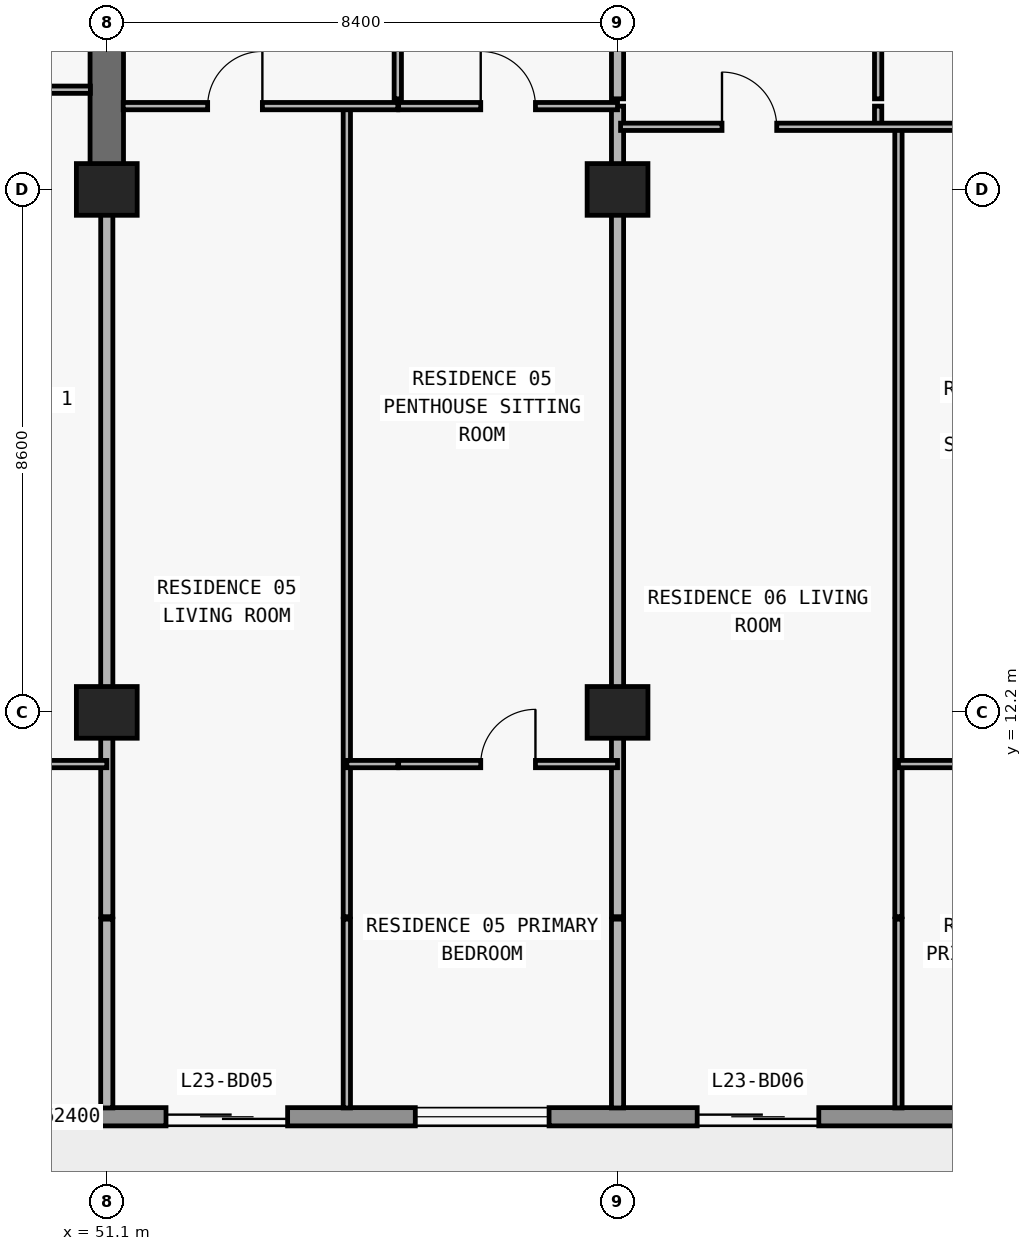
"""IFC4 building model, lengths in metres.
Left out: names, types, materials, properties, quantities, classifications, styles, units other than length and angle.
Written with IfcOpenShell. Run it as: python <this file> out.ifc"""

import sys

from ifc_helpers import new_model, si_unit, direction, frame, frame_2d, origin, origin_2d, place, context, subcontext, project, spatial, rectangle, extrude, element, fill, save


model = new_model("IFC4")
c1 = context("Model", 3, precision=1e-05, world=origin(), true_north=direction((0.0, 1.0)))
c2 = subcontext(c1, "Body", "Model", "MODEL_VIEW")
j1 = project(units=[si_unit("LENGTHUNIT", "METRE"), si_unit("PLANEANGLEUNIT", "RADIAN")], contexts=[c1])
p1 = place(None, origin())
s1 = spatial("IfcSite", under=j1, at=p1, CompositionType="ELEMENT")
p2 = place(p1, origin())
s2 = spatial("IfcBuilding", under=s1, at=p2, CompositionType="ELEMENT")
p3 = place(p2, frame((0.0, 0.0, 87.9)))
s3 = spatial("IfcBuildingStorey", under=s2, at=p3, CompositionType="ELEMENT", Elevation=87.9)
for number, where, z_axis, x_axis in (
    (1, (51.1, 12.2, 0.0), (0.0, 0.0, 1.0), (1.0, 0.0, 0.0)),
    (2, (59.5, 12.2, 0.0), (0.0, 0.0, 1.0), (1.0, 0.0, 0.0)),
    (3, (51.1, 20.8, 0.0), (0.0, 0.0, 1.0), (1.0, 0.0, 0.0)),
    (4, (59.5, 20.8, 0.0), (0.0, 0.0, 1.0), (1.0, 0.0, 0.0)),
):
    element("IfcColumn", number, at=place(p3, frame(where, z_axis=z_axis, x_axis=x_axis)), inside=s3, PredefinedType="COLUMN", context=c2, shape_type="SweptSolid", body=[
        extrude(rectangle(XDim=1.0, YDim=0.85, at=origin_2d()), origin(), (0.0, 0.0, 1.0), 3.05),
    ])
p4 = place(p3, frame((51.1, 20.8, 0.0), z_axis=(0.0, 0.0, 1.0), x_axis=(0.0, 1.0, 0.0)))
e5 = element("IfcWall", 5, at=p4, inside=s3, PredefinedType="SHEAR", context=c2, shape_type="SweptSolid", body=[
    extrude(rectangle(XDim=8.6, YDim=0.55, at=frame_2d((4.3, 0.0))), origin(), (0.0, 0.0, 1.0), 3.05),
])
p5 = place(p3, frame((70.1, 5.55, 0.0), z_axis=(0.0, 0.0, 1.0), x_axis=(-1.0, 0.0, 0.0)))
e6 = element("IfcWall", 6, at=p5, inside=s3, PredefinedType="STANDARD", context=c2, shape_type="SweptSolid", body=[
    extrude(rectangle(XDim=62.4, YDim=0.3, at=frame_2d((31.2, 0.0))), origin(), (0.0, 0.0, 1.0), 3.05),
])
p6 = place(p5, frame((57.226, 0.0, 0.0)))
e7 = element("IfcOpeningElement", 7, at=p6, cuts=e6, PredefinedType="OPENING", context=c2, shape_type="SweptSolid", body=[
    extrude(rectangle(XDim=2.0, YDim=2.3, at=frame_2d((1.0, 1.15))), frame((0.0, 0.16, 0.0), z_axis=(0.0, -1.0, 0.0), x_axis=(1.0, 0.0, 0.0)), (0.0, 0.0, 1.0), 0.32),
])
p7 = place(p5, frame((52.926, 0.0, 0.85)))
e8 = element("IfcOpeningElement", 8, at=p7, cuts=e6, PredefinedType="OPENING", context=c2, shape_type="SweptSolid", body=[
    extrude(rectangle(XDim=2.2, YDim=1.55, at=frame_2d((1.1, 0.775))), frame((0.0, 0.16, 0.0), z_axis=(0.0, -1.0, 0.0), x_axis=(1.0, 0.0, 0.0)), (0.0, 0.0, 1.0), 0.32),
])
p8 = place(p5, frame((48.49, 0.0, 0.0)))
e9 = element("IfcOpeningElement", 9, at=p8, cuts=e6, PredefinedType="OPENING", context=c2, shape_type="SweptSolid", body=[
    extrude(rectangle(XDim=2.0, YDim=2.3, at=frame_2d((1.0, 1.15))), frame((0.0, 0.16, 0.0), z_axis=(0.0, -1.0, 0.0), x_axis=(1.0, 0.0, 0.0)), (0.0, 0.0, 1.0), 0.32),
])
p9 = place(p5, frame((44.39, 0.0, 0.85)))
e10 = element("IfcOpeningElement", 10, at=p9, cuts=e6, PredefinedType="OPENING", context=c2, shape_type="SweptSolid", body=[
    extrude(rectangle(XDim=1.8, YDim=1.55, at=frame_2d((0.9, 0.775))), frame((0.0, 0.16, 0.0), z_axis=(0.0, -1.0, 0.0), x_axis=(1.0, 0.0, 0.0)), (0.0, 0.0, 1.0), 0.32),
])
p10 = place(p5, frame((40.426, 0.0, 0.0)))
e11 = element("IfcOpeningElement", 11, at=p10, cuts=e6, PredefinedType="OPENING", context=c2, shape_type="SweptSolid", body=[
    extrude(rectangle(XDim=2.0, YDim=2.3, at=frame_2d((1.0, 1.15))), frame((0.0, 0.16, 0.0), z_axis=(0.0, -1.0, 0.0), x_axis=(1.0, 0.0, 0.0)), (0.0, 0.0, 1.0), 0.32),
])
p11 = place(p5, frame((36.126, 0.0, 0.85)))
e12 = element("IfcOpeningElement", 12, at=p11, cuts=e6, PredefinedType="OPENING", context=c2, shape_type="SweptSolid", body=[
    extrude(rectangle(XDim=2.2, YDim=1.55, at=frame_2d((1.1, 0.775))), frame((0.0, 0.16, 0.0), z_axis=(0.0, -1.0, 0.0), x_axis=(1.0, 0.0, 0.0)), (0.0, 0.0, 1.0), 0.32),
])
p12 = place(p5, frame((32.09, 0.0, 0.0)))
e13 = element("IfcOpeningElement", 13, at=p12, cuts=e6, PredefinedType="OPENING", context=c2, shape_type="SweptSolid", body=[
    extrude(rectangle(XDim=2.0, YDim=2.3, at=frame_2d((1.0, 1.15))), frame((0.0, 0.16, 0.0), z_axis=(0.0, -1.0, 0.0), x_axis=(1.0, 0.0, 0.0)), (0.0, 0.0, 1.0), 0.32),
])
p13 = place(p5, frame((28.21, 0.0, 0.65)))
e14 = element("IfcOpeningElement", 14, at=p13, cuts=e6, PredefinedType="OPENING", context=c2, shape_type="SweptSolid", body=[
    extrude(rectangle(XDim=2.6, YDim=1.85, at=frame_2d((1.3, 0.925))), frame((0.0, 0.16, 0.0), z_axis=(0.0, -1.0, 0.0), x_axis=(1.0, 0.0, 0.0)), (0.0, 0.0, 1.0), 0.32),
])
p14 = place(p5, frame((22.1, 0.0, 0.85)))
e15 = element("IfcOpeningElement", 15, at=p14, cuts=e6, PredefinedType="OPENING", context=c2, shape_type="SweptSolid", body=[
    extrude(rectangle(XDim=2.2, YDim=1.55, at=frame_2d((1.1, 0.775))), frame((0.0, 0.16, 0.0), z_axis=(0.0, -1.0, 0.0), x_axis=(1.0, 0.0, 0.0)), (0.0, 0.0, 1.0), 0.32),
])
p15 = place(p5, frame((16.026, 0.0, 0.0)))
e16 = element("IfcOpeningElement", 16, at=p15, cuts=e6, PredefinedType="OPENING", context=c2, shape_type="SweptSolid", body=[
    extrude(rectangle(XDim=2.0, YDim=2.3, at=frame_2d((1.0, 1.15))), frame((0.0, 0.16, 0.0), z_axis=(0.0, -1.0, 0.0), x_axis=(1.0, 0.0, 0.0)), (0.0, 0.0, 1.0), 0.32),
])
p16 = place(p5, frame((11.726, 0.0, 0.85)))
e17 = element("IfcOpeningElement", 17, at=p16, cuts=e6, PredefinedType="OPENING", context=c2, shape_type="SweptSolid", body=[
    extrude(rectangle(XDim=2.2, YDim=1.55, at=frame_2d((1.1, 0.775))), frame((0.0, 0.16, 0.0), z_axis=(0.0, -1.0, 0.0), x_axis=(1.0, 0.0, 0.0)), (0.0, 0.0, 1.0), 0.32),
])
p17 = place(p5, frame((7.29, 0.0, 0.0)))
e18 = element("IfcOpeningElement", 18, at=p17, cuts=e6, PredefinedType="OPENING", context=c2, shape_type="SweptSolid", body=[
    extrude(rectangle(XDim=2.0, YDim=2.3, at=frame_2d((1.0, 1.15))), frame((0.0, 0.16, 0.0), z_axis=(0.0, -1.0, 0.0), x_axis=(1.0, 0.0, 0.0)), (0.0, 0.0, 1.0), 0.32),
])
p18 = place(p5, frame((3.19, 0.0, 0.85)))
e19 = element("IfcOpeningElement", 19, at=p18, cuts=e6, PredefinedType="OPENING", context=c2, shape_type="SweptSolid", body=[
    extrude(rectangle(XDim=1.8, YDim=1.55, at=frame_2d((0.9, 0.775))), frame((0.0, 0.16, 0.0), z_axis=(0.0, -1.0, 0.0), x_axis=(1.0, 0.0, 0.0)), (0.0, 0.0, 1.0), 0.32),
])
p19 = place(p3, frame((51.1, 5.695, 0.0), z_axis=(0.0, 0.0, 1.0), x_axis=(0.0, 1.0, 0.0)))
e20 = element("IfcWall", 20, at=p19, inside=s3, PredefinedType="PARTITIONING", context=c2, shape_type="SweptSolid", body=[
    extrude(rectangle(XDim=3.105, YDim=0.2, at=frame_2d((1.552, 0.0))), origin(), (0.0, 0.0, 1.0), 3.05),
])
p20 = place(p3, frame((51.1, 8.84, 0.0), z_axis=(0.0, 0.0, 1.0), x_axis=(0.0, 1.0, 0.0)))
e21 = element("IfcWall", 21, at=p20, inside=s3, PredefinedType="PARTITIONING", context=c2, shape_type="SweptSolid", body=[
    extrude(rectangle(XDim=11.955, YDim=0.2, at=frame_2d((5.978, 0.0))), origin(), (0.0, 0.0, 1.0), 2.174),
])
p21 = place(p3, frame((55.048, 5.695, 0.0), z_axis=(0.0, 0.0, 1.0), x_axis=(0.0, 1.0, 0.0)))
e22 = element("IfcWall", 22, at=p21, inside=s3, PredefinedType="PARTITIONING", context=c2, shape_type="SweptSolid", body=[
    extrude(rectangle(XDim=3.105, YDim=0.12, at=frame_2d((1.552, 0.0))), origin(), (0.0, 0.0, 1.0), 3.05),
])
p22 = place(p3, frame((55.048, 8.84, 0.0), z_axis=(0.0, 0.0, 1.0), x_axis=(0.0, 1.0, 0.0)))
e23 = element("IfcWall", 23, at=p22, inside=s3, PredefinedType="PARTITIONING", context=c2, shape_type="SweptSolid", body=[
    extrude(rectangle(XDim=13.33, YDim=0.12, at=frame_2d((6.665, 0.0))), origin(), (0.0, 0.0, 1.0), 3.05),
])
p23 = place(p3, frame((55.886, 22.29, 0.0), z_axis=(0.0, 0.0, 1.0), x_axis=(0.0, 1.0, 0.0)))
e24 = element("IfcWall", 24, at=p23, inside=s3, PredefinedType="PARTITIONING", context=c2, shape_type="SweptSolid", body=[
    extrude(rectangle(XDim=4.69, YDim=0.12, at=frame_2d((2.345, 0.0))), origin(), (0.0, 0.0, 1.0), 3.05),
])
p24 = place(p23, frame((1.895, 0.0, 0.0)))
e25 = element("IfcOpeningElement", 25, at=p24, cuts=e24, PredefinedType="OPENING", context=c2, shape_type="SweptSolid", body=[
    extrude(rectangle(XDim=0.9, YDim=2.15, at=frame_2d((0.45, 1.075))), frame((0.0, 0.07, 0.0), z_axis=(0.0, -1.0, 0.0), x_axis=(1.0, 0.0, 0.0)), (0.0, 0.0, 1.0), 0.14),
])
p25 = place(p3, frame((59.5, 5.695, 0.0), z_axis=(0.0, 0.0, 1.0), x_axis=(0.0, 1.0, 0.0)))
e26 = element("IfcWall", 26, at=p25, inside=s3, PredefinedType="PARTITIONING", context=c2, shape_type="SweptSolid", body=[
    extrude(rectangle(XDim=3.105, YDim=0.2, at=frame_2d((1.552, 0.0))), origin(), (0.0, 0.0, 1.0), 3.05),
])
p26 = place(p3, frame((59.5, 8.84, 0.0), z_axis=(0.0, 0.0, 1.0), x_axis=(0.0, 1.0, 0.0)))
e27 = element("IfcWall", 27, at=p26, inside=s3, PredefinedType="PARTITIONING", context=c2, shape_type="SweptSolid", body=[
    extrude(rectangle(XDim=13.33, YDim=0.2, at=frame_2d((6.665, 0.0))), origin(), (0.0, 0.0, 1.0), 2.174),
])
p27 = place(p3, frame((59.5, 22.29, 0.0), z_axis=(0.0, 0.0, 1.0), x_axis=(0.0, 1.0, 0.0)))
e28 = element("IfcWall", 28, at=p27, inside=s3, PredefinedType="PARTITIONING", context=c2, shape_type="SweptSolid", body=[
    extrude(rectangle(XDim=4.69, YDim=0.2, at=frame_2d((2.345, 0.0))), origin(), (0.0, 0.0, 1.0), 2.174),
])
p28 = place(p3, frame((63.786, 21.83, 0.0), z_axis=(0.0, 0.0, 1.0), x_axis=(0.0, 1.0, 0.0)))
e29 = element("IfcWall", 29, at=p28, inside=s3, PredefinedType="PARTITIONING", context=c2, shape_type="SweptSolid", body=[
    extrude(rectangle(XDim=0.34, YDim=0.12, at=frame_2d((0.17, 0.0))), origin(), (0.0, 0.0, 1.0), 3.05),
])
p29 = place(p3, frame((63.786, 22.29, 0.0), z_axis=(0.0, 0.0, 1.0), x_axis=(0.0, 1.0, 0.0)))
e30 = element("IfcWall", 30, at=p29, inside=s3, PredefinedType="PARTITIONING", context=c2, shape_type="SweptSolid", body=[
    extrude(rectangle(XDim=4.69, YDim=0.12, at=frame_2d((2.345, 0.0))), origin(), (0.0, 0.0, 1.0), 3.05),
])
p30 = place(p29, frame((1.895, 0.0, 0.0)))
e31 = element("IfcOpeningElement", 31, at=p30, cuts=e30, PredefinedType="OPENING", context=c2, shape_type="SweptSolid", body=[
    extrude(rectangle(XDim=0.9, YDim=2.15, at=frame_2d((0.45, 1.075))), frame((0.0, 0.07, 0.0), z_axis=(0.0, -1.0, 0.0), x_axis=(1.0, 0.0, 0.0)), (0.0, 0.0, 1.0), 0.14),
])
p31 = place(p3, frame((64.12, 5.695, 0.0), z_axis=(0.0, 0.0, 1.0), x_axis=(0.0, 1.0, 0.0)))
e32 = element("IfcWall", 32, at=p31, inside=s3, PredefinedType="PARTITIONING", context=c2, shape_type="SweptSolid", body=[
    extrude(rectangle(XDim=3.105, YDim=0.12, at=frame_2d((1.552, 0.0))), origin(), (0.0, 0.0, 1.0), 3.05),
])
p32 = place(p3, frame((64.12, 8.84, 0.0), z_axis=(0.0, 0.0, 1.0), x_axis=(0.0, 1.0, 0.0)))
e33 = element("IfcWall", 33, at=p32, inside=s3, PredefinedType="PARTITIONING", context=c2, shape_type="SweptSolid", body=[
    extrude(rectangle(XDim=12.99, YDim=0.12, at=frame_2d((6.495, 0.0))), origin(), (0.0, 0.0, 1.0), 3.05),
])
p33 = place(p3, frame((42.7, 11.35, 0.0), z_axis=(0.0, 0.0, 1.0), x_axis=(1.0, 0.0, 0.0)))
e34 = element("IfcWall", 34, at=p33, inside=s3, PredefinedType="PARTITIONING", context=c2, shape_type="SweptSolid", body=[
    extrude(rectangle(XDim=8.4, YDim=0.12, at=frame_2d((4.2, 0.0))), origin(), (0.0, 0.0, 1.0), 3.05),
])
p34 = place(p33, frame((3.75, 0.0, 0.0)))
e35 = element("IfcOpeningElement", 35, at=p34, cuts=e34, PredefinedType="OPENING", context=c2, shape_type="SweptSolid", body=[
    extrude(rectangle(XDim=0.9, YDim=2.15, at=frame_2d((0.45, 1.075))), frame((0.0, 0.07, 0.0), z_axis=(0.0, -1.0, 0.0), x_axis=(1.0, 0.0, 0.0)), (0.0, 0.0, 1.0), 0.14),
])
p35 = place(p3, frame((55.048, 11.35, 0.0), z_axis=(0.0, 0.0, 1.0), x_axis=(1.0, 0.0, 0.0)))
e36 = element("IfcWall", 36, at=p35, inside=s3, PredefinedType="PARTITIONING", context=c2, shape_type="SweptSolid", body=[
    extrude(rectangle(XDim=0.838, YDim=0.12, at=frame_2d((0.419, 0.0))), origin(), (0.0, 0.0, 1.0), 3.05),
])
p36 = place(p3, frame((55.9, 11.35, 0.0), z_axis=(0.0, 0.0, 1.0), x_axis=(1.0, 0.0, 0.0)))
e37 = element("IfcWall", 37, at=p36, inside=s3, PredefinedType="PARTITIONING", context=c2, shape_type="SweptSolid", body=[
    extrude(rectangle(XDim=3.6, YDim=0.12, at=frame_2d((1.8, 0.0))), origin(), (0.0, 0.0, 1.0), 3.05),
])
p37 = place(p36, frame((1.35, 0.0, 0.0)))
e38 = element("IfcOpeningElement", 38, at=p37, cuts=e37, PredefinedType="OPENING", context=c2, shape_type="SweptSolid", body=[
    extrude(rectangle(XDim=0.9, YDim=2.15, at=frame_2d((0.45, 1.075))), frame((0.0, 0.07, 0.0), z_axis=(0.0, -1.0, 0.0), x_axis=(1.0, 0.0, 0.0)), (0.0, 0.0, 1.0), 0.14),
])
p38 = place(p3, frame((64.12, 11.35, 0.0), z_axis=(0.0, 0.0, 1.0), x_axis=(1.0, 0.0, 0.0)))
e39 = element("IfcWall", 39, at=p38, inside=s3, PredefinedType="PARTITIONING", context=c2, shape_type="SweptSolid", body=[
    extrude(rectangle(XDim=3.78, YDim=0.12, at=frame_2d((1.89, 0.0))), origin(), (0.0, 0.0, 1.0), 3.05),
])
p39 = place(p38, frame((1.44, 0.0, 0.0)))
e40 = element("IfcOpeningElement", 40, at=p39, cuts=e39, PredefinedType="OPENING", context=c2, shape_type="SweptSolid", body=[
    extrude(rectangle(XDim=0.9, YDim=2.15, at=frame_2d((0.45, 1.075))), frame((0.0, 0.07, 0.0), z_axis=(0.0, -1.0, 0.0), x_axis=(1.0, 0.0, 0.0)), (0.0, 0.0, 1.0), 0.14),
])
p40 = place(p3, frame((59.55, 21.83, 0.0), z_axis=(0.0, 0.0, 1.0), x_axis=(1.0, 0.0, 0.0)))
e41 = element("IfcWall", 41, at=p40, inside=s3, PredefinedType="PARTITIONING", context=c2, shape_type="SweptSolid", body=[
    extrude(rectangle(XDim=8.35, YDim=0.12, at=frame_2d((4.175, 0.0))), origin(), (0.0, 0.0, 1.0), 3.05),
])
p41 = place(p40, frame((1.668, 0.0, 0.0)))
e42 = element("IfcOpeningElement", 42, at=p41, cuts=e41, PredefinedType="OPENING", context=c2, shape_type="SweptSolid", body=[
    extrude(rectangle(XDim=0.9, YDim=2.15, at=frame_2d((0.45, 1.075))), frame((0.0, 0.07, 0.0), z_axis=(0.0, -1.0, 0.0), x_axis=(1.0, 0.0, 0.0)), (0.0, 0.0, 1.0), 0.14),
])
p42 = place(p40, frame((6.01, 0.0, 0.0)))
e43 = element("IfcOpeningElement", 43, at=p42, cuts=e41, PredefinedType="OPENING", context=c2, shape_type="SweptSolid", body=[
    extrude(rectangle(XDim=0.9, YDim=2.15, at=frame_2d((0.45, 1.075))), frame((0.0, 0.07, 0.0), z_axis=(0.0, -1.0, 0.0), x_axis=(1.0, 0.0, 0.0)), (0.0, 0.0, 1.0), 0.14),
])
p43 = place(p3, frame((51.37, 22.17, 0.0), z_axis=(0.0, 0.0, 1.0), x_axis=(1.0, 0.0, 0.0)))
e44 = element("IfcWall", 44, at=p43, inside=s3, PredefinedType="PARTITIONING", context=c2, shape_type="SweptSolid", body=[
    extrude(rectangle(XDim=4.516, YDim=0.12, at=frame_2d((2.258, 0.0))), origin(), (0.0, 0.0, 1.0), 3.05),
])
p44 = place(p43, frame((1.389, 0.0, 0.0)))
e45 = element("IfcOpeningElement", 45, at=p44, cuts=e44, PredefinedType="OPENING", context=c2, shape_type="SweptSolid", body=[
    extrude(rectangle(XDim=0.9, YDim=2.15, at=frame_2d((0.45, 1.075))), frame((0.0, 0.07, 0.0), z_axis=(0.0, -1.0, 0.0), x_axis=(1.0, 0.0, 0.0)), (0.0, 0.0, 1.0), 0.14),
])
p45 = place(p3, frame((55.9, 22.17, 0.0), z_axis=(0.0, 0.0, 1.0), x_axis=(1.0, 0.0, 0.0)))
e46 = element("IfcWall", 46, at=p45, inside=s3, PredefinedType="PARTITIONING", context=c2, shape_type="SweptSolid", body=[
    extrude(rectangle(XDim=3.6, YDim=0.12, at=frame_2d((1.8, 0.0))), origin(), (0.0, 0.0, 1.0), 3.05),
])
p46 = place(p45, frame((1.35, 0.0, 0.0)))
e47 = element("IfcOpeningElement", 47, at=p46, cuts=e46, PredefinedType="OPENING", context=c2, shape_type="SweptSolid", body=[
    extrude(rectangle(XDim=0.9, YDim=2.15, at=frame_2d((0.45, 1.075))), frame((0.0, 0.07, 0.0), z_axis=(0.0, -1.0, 0.0), x_axis=(1.0, 0.0, 0.0)), (0.0, 0.0, 1.0), 0.14),
])
p47 = place(p3, frame((42.7, 22.44, 0.0), z_axis=(0.0, 0.0, 1.0), x_axis=(1.0, 0.0, 0.0)))
e48 = element("IfcWall", 48, at=p47, inside=s3, PredefinedType="PARTITIONING", context=c2, shape_type="SweptSolid", body=[
    extrude(rectangle(XDim=8.13, YDim=0.12, at=frame_2d((4.065, 0.0))), origin(), (0.0, 0.0, 1.0), 3.05),
])
p48 = place(p47, frame((3.615, 0.0, 0.0)))
e49 = element("IfcOpeningElement", 49, at=p48, cuts=e48, PredefinedType="OPENING", context=c2, shape_type="SweptSolid", body=[
    extrude(rectangle(XDim=0.9, YDim=2.15, at=frame_2d((0.45, 1.075))), frame((0.0, 0.07, 0.0), z_axis=(0.0, -1.0, 0.0), x_axis=(1.0, 0.0, 0.0)), (0.0, 0.0, 1.0), 0.14),
])
p49 = place(p15, origin())
e50 = element("IfcDoor", 50, at=p49, inside=s3, OperationType="DOUBLE_DOOR_SLIDING", PredefinedType="DOOR", context=c2, shape_type="SweptSolid", body=[
    extrude(rectangle(XDim=2.0, YDim=2.3, at=frame_2d((1.0, 1.15))), frame((0.0, 0.025, 0.0), z_axis=(0.0, -1.0, 0.0), x_axis=(1.0, 0.0, 0.0)), (0.0, 0.0, 1.0), 0.05),
])
fill(e16, e50)
p50 = place(p16, origin())
e51 = element("IfcWindow", 51, at=p50, inside=s3, PartitioningType="SINGLE_PANEL", PredefinedType="WINDOW", context=c2, shape_type="SweptSolid", body=[
    extrude(rectangle(XDim=2.2, YDim=1.55, at=frame_2d((1.1, 0.775))), frame((0.0, 0.03, 0.0), z_axis=(0.0, -1.0, 0.0), x_axis=(1.0, 0.0, 0.0)), (0.0, 0.0, 1.0), 0.06),
])
fill(e17, e51)
p51 = place(p17, origin())
e52 = element("IfcDoor", 52, at=p51, inside=s3, OperationType="DOUBLE_DOOR_SLIDING", PredefinedType="DOOR", context=c2, shape_type="SweptSolid", body=[
    extrude(rectangle(XDim=2.0, YDim=2.3, at=frame_2d((1.0, 1.15))), frame((0.0, 0.025, 0.0), z_axis=(0.0, -1.0, 0.0), x_axis=(1.0, 0.0, 0.0)), (0.0, 0.0, 1.0), 0.05),
])
fill(e18, e52)
p52 = place(p44, origin())
e53 = element("IfcDoor", 53, at=p52, inside=s3, OperationType="SINGLE_SWING_RIGHT", PredefinedType="DOOR", context=c2, shape_type="SweptSolid", body=[
    extrude(rectangle(XDim=0.9, YDim=2.15, at=frame_2d((0.45, 1.075))), frame((0.0, 0.025, 0.0), z_axis=(0.0, -1.0, 0.0), x_axis=(1.0, 0.0, 0.0)), (0.0, 0.0, 1.0), 0.05),
])
fill(e45, e53)
p53 = place(p46, origin())
e54 = element("IfcDoor", 54, at=p53, inside=s3, OperationType="SINGLE_SWING_LEFT", PredefinedType="DOOR", context=c2, shape_type="SweptSolid", body=[
    extrude(rectangle(XDim=0.9, YDim=2.15, at=frame_2d((0.45, 1.075))), frame((0.0, 0.025, 0.0), z_axis=(0.0, -1.0, 0.0), x_axis=(1.0, 0.0, 0.0)), (0.0, 0.0, 1.0), 0.05),
])
fill(e47, e54)
p54 = place(p37, origin())
e55 = element("IfcDoor", 55, at=p54, inside=s3, OperationType="SINGLE_SWING_RIGHT", PredefinedType="DOOR", context=c2, shape_type="SweptSolid", body=[
    extrude(rectangle(XDim=0.9, YDim=2.15, at=frame_2d((0.45, 1.075))), frame((0.0, 0.025, 0.0), z_axis=(0.0, -1.0, 0.0), x_axis=(1.0, 0.0, 0.0)), (0.0, 0.0, 1.0), 0.05),
])
fill(e38, e55)
p55 = place(p41, origin())
e56 = element("IfcDoor", 56, at=p55, inside=s3, OperationType="SINGLE_SWING_LEFT", PredefinedType="DOOR", context=c2, shape_type="SweptSolid", body=[
    extrude(rectangle(XDim=0.9, YDim=2.15, at=frame_2d((0.45, 1.075))), frame((0.0, 0.025, 0.0), z_axis=(0.0, -1.0, 0.0), x_axis=(1.0, 0.0, 0.0)), (0.0, 0.0, 1.0), 0.05),
])
fill(e42, e56)
save(model, sys.argv[1])
